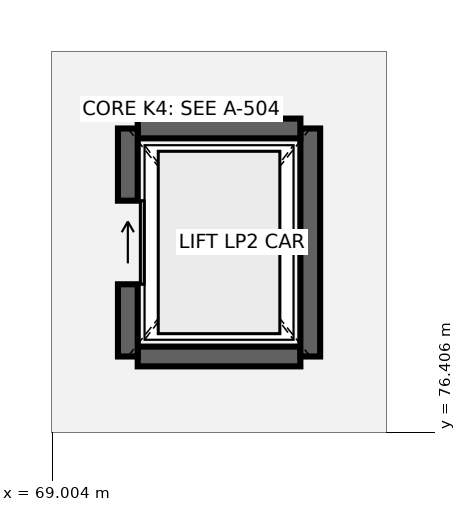
"""IFC4 building model, lengths in metres.
Left out: names, types, materials, properties, quantities, classifications, styles, units other than length and angle.
Written with IfcOpenShell. Run it as: python <this file> out.ifc"""

import sys

from ifc_helpers import new_model, si_unit, direction, frame, frame_2d, origin, place, context, subcontext, project, spatial, rectangle, extrude, element, fill, save


model = new_model("IFC4")
c1 = context("Model", 3, precision=1e-05, world=origin(), true_north=direction((0.0, 1.0)))
c2 = subcontext(c1, "Body", "Model", "MODEL_VIEW")
j1 = project(units=[si_unit("LENGTHUNIT", "METRE"), si_unit("PLANEANGLEUNIT", "RADIAN")], contexts=[c1])
p1 = place(None, origin())
s1 = spatial("IfcSite", under=j1, at=p1, CompositionType="ELEMENT")
p2 = place(p1, origin())
s2 = spatial("IfcBuilding", under=s1, at=p2, CompositionType="ELEMENT")
p3 = place(p2, origin())
s3 = spatial("IfcBuildingStorey", under=s2, at=p3, CompositionType="ELEMENT", Elevation=0.0)
p4 = place(p3, frame((70.13, 77.4, 0.0), z_axis=(0.0, 0.0, 1.0), x_axis=(1.0, 0.0, 0.0)))
e1 = element("IfcWall", 1, at=p4, inside=s3, PredefinedType="SHEAR", context=c2, shape_type="SweptSolid", body=[
    extrude(rectangle(XDim=2.14, YDim=0.26, at=frame_2d((1.07, 0.0))), origin(), (0.0, 0.0, 1.0), 5.09),
])
p5 = place(p3, frame((72.4, 77.4, 0.0), z_axis=(0.0, 0.0, 1.0), x_axis=(0.0, 1.0, 0.0)))
e2 = element("IfcWall", 2, at=p5, inside=s3, PredefinedType="SHEAR", context=c2, shape_type="SweptSolid", body=[
    extrude(rectangle(XDim=3.0, YDim=0.26, at=frame_2d((1.5, 0.0))), origin(), (0.0, 0.0, 1.0), 5.09),
])
p6 = place(p3, frame((72.27, 80.4, 0.0), z_axis=(0.0, 0.0, 1.0), x_axis=(-1.0, 0.0, 0.0)))
e3 = element("IfcWall", 3, at=p6, inside=s3, PredefinedType="SHEAR", context=c2, shape_type="SweptSolid", body=[
    extrude(rectangle(XDim=2.14, YDim=0.26, at=frame_2d((1.07, 0.0))), origin(), (0.0, 0.0, 1.0), 5.09),
])
p7 = place(p3, frame((70.0, 80.4, 0.0), z_axis=(0.0, 0.0, 1.0), x_axis=(0.0, -1.0, 0.0)))
e4 = element("IfcWall", 4, at=p7, inside=s3, PredefinedType="SHEAR", context=c2, shape_type="SweptSolid", body=[
    extrude(rectangle(XDim=3.0, YDim=0.26, at=frame_2d((1.5, 0.0))), origin(), (0.0, 0.0, 1.0), 5.09),
])
p8 = place(p7, frame((0.95, 0.0, 0.0)))
e5 = element("IfcOpeningElement", 5, at=p8, cuts=e4, PredefinedType="OPENING", context=c2, shape_type="SweptSolid", body=[
    extrude(rectangle(XDim=1.1, YDim=2.1, at=frame_2d((0.55, 1.05))), frame((0.0, 0.14, 0.0), z_axis=(0.0, -1.0, 0.0), x_axis=(1.0, 0.0, 0.0)), (0.0, 0.0, 1.0), 0.28),
])
p9 = place(p8, origin())
e6 = element("IfcDoor", 6, at=p9, inside=s3, OperationType="SLIDING_TO_LEFT", PredefinedType="DOOR", context=c2, shape_type="SweptSolid", body=[
    extrude(rectangle(XDim=1.1, YDim=2.1, at=frame_2d((0.55, 1.05))), frame((0.0, 0.025, 0.0), z_axis=(0.0, -1.0, 0.0), x_axis=(1.0, 0.0, 0.0)), (0.0, 0.0, 1.0), 0.05),
])
fill(e5, e6)
save(model, sys.argv[1])
